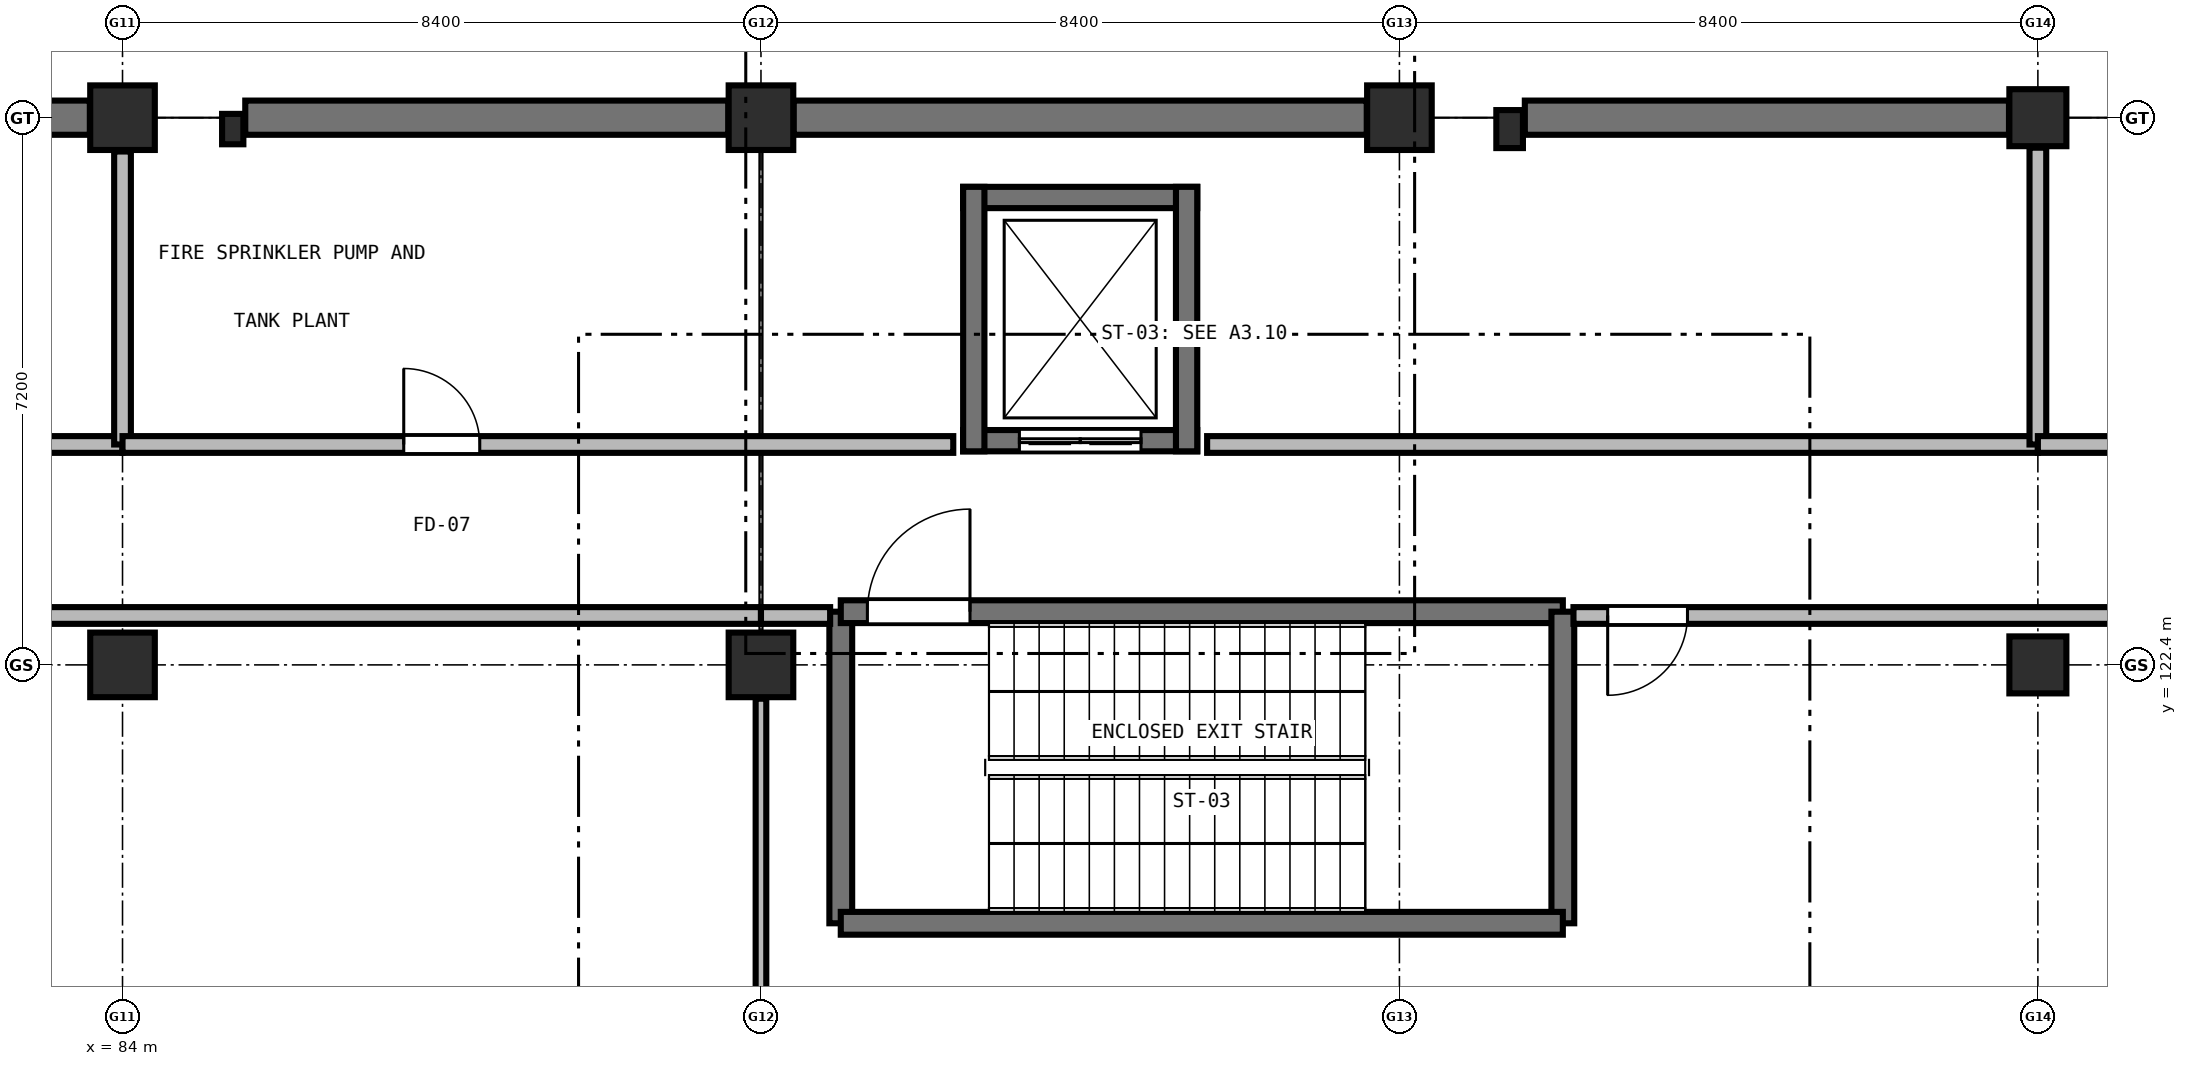
"""IFC4 building model, lengths in metres.
Left out: names, types, materials, properties, quantities, classifications, styles, units other than length and angle.
Written with IfcOpenShell. Run it as: python <this file> out.ifc"""

import sys

from ifc_helpers import new_model, si_unit, direction, frame, frame_2d, origin, origin_2d, place, context, subcontext, project, spatial, rectangle, extrude, element, fill, save


model = new_model("IFC4")
c1 = context("Model", 3, precision=1e-05, world=origin(), true_north=direction((0.0, 1.0)))
c2 = subcontext(c1, "Body", "Model", "MODEL_VIEW")
j1 = project(units=[si_unit("LENGTHUNIT", "METRE"), si_unit("PLANEANGLEUNIT", "RADIAN")], contexts=[c1])
p1 = place(None, origin())
s1 = spatial("IfcSite", under=j1, at=p1, CompositionType="ELEMENT")
p2 = place(p1, origin())
s2 = spatial("IfcBuilding", under=s1, at=p2, CompositionType="ELEMENT")
p3 = place(p2, frame((0.0, 0.0, -4.8)))
s3 = spatial("IfcBuildingStorey", under=s2, at=p3, CompositionType="ELEMENT", Elevation=-4.8)
for number, where, z_axis, x_axis in (
    (1, (84.0, 122.4, 0.0), (0.0, 0.0, 1.0), (1.0, 0.0, 0.0)),
    (2, (84.0, 129.6, 0.0), (0.0, 0.0, 1.0), (1.0, 0.0, 0.0)),
    (3, (92.4, 122.4, 0.0), (0.0, 0.0, 1.0), (1.0, 0.0, 0.0)),
    (4, (92.4, 129.6, 0.0), (0.0, 0.0, 1.0), (1.0, 0.0, 0.0)),
    (5, (100.8, 129.6, 0.0), (0.0, 0.0, 1.0), (1.0, 0.0, 0.0)),
):
    element("IfcColumn", number, at=place(p3, frame(where, z_axis=z_axis, x_axis=x_axis)), inside=s3, PredefinedType="COLUMN", context=c2, shape_type="SweptSolid", body=[
        extrude(rectangle(XDim=0.85, YDim=0.85, at=origin_2d()), origin(), (0.0, 0.0, 1.0), 4.8),
    ])
for number, where, z_axis, x_axis in (
    (6, (109.2, 122.4, 0.0), (0.0, 0.0, 1.0), (1.0, 0.0, 0.0)),
    (7, (109.2, 129.6, 0.0), (0.0, 0.0, 1.0), (1.0, 0.0, 0.0)),
):
    element("IfcColumn", number, at=place(p3, frame(where, z_axis=z_axis, x_axis=x_axis)), inside=s3, PredefinedType="COLUMN", context=c2, shape_type="SweptSolid", body=[
        extrude(rectangle(XDim=0.75, YDim=0.75, at=origin_2d()), origin(), (0.0, 0.0, 1.0), 4.8),
    ])
p4 = place(p3, frame((85.45, 129.45, 0.0), z_axis=(0.0, 0.0, 1.0), x_axis=(1.0, 0.0, 0.0)))
e8 = element("IfcColumn", 8, at=p4, inside=s3, PredefinedType="PILASTER", context=c2, shape_type="SweptSolid", body=[
    extrude(rectangle(XDim=0.28, YDim=0.4, at=origin_2d()), origin(), (0.0, 0.0, 1.0), 3.85),
])
p5 = place(p3, frame((102.25, 129.45, 0.0), z_axis=(0.0, 0.0, 1.0), x_axis=(1.0, 0.0, 0.0)))
e9 = element("IfcColumn", 9, at=p5, inside=s3, PredefinedType="PILASTER", context=c2, shape_type="SweptSolid", body=[
    extrude(rectangle(XDim=0.35, YDim=0.5, at=origin_2d()), origin(), (0.0, 0.0, 1.0), 3.85),
])
p6 = place(p3, frame((77.225, 129.6, 0.0), z_axis=(0.0, 0.0, 1.0), x_axis=(1.0, 0.0, 0.0)))
e10 = element("IfcWall", 10, at=p6, inside=s3, PredefinedType="SHEAR", context=c2, shape_type="SweptSolid", body=[
    extrude(rectangle(XDim=6.345, YDim=0.45, at=frame_2d((3.172, 0.0))), origin(), (0.0, 0.0, 1.0), 3.64),
])
p7 = place(p3, frame((85.615, 129.6, 0.0), z_axis=(0.0, 0.0, 1.0), x_axis=(1.0, 0.0, 0.0)))
e11 = element("IfcWall", 11, at=p7, inside=s3, PredefinedType="SHEAR", context=c2, shape_type="SweptSolid", body=[
    extrude(rectangle(XDim=6.355, YDim=0.45, at=frame_2d((3.177, 0.0))), origin(), (0.0, 0.0, 1.0), 3.64),
])
p8 = place(p3, frame((92.83, 129.6, 0.0), z_axis=(0.0, 0.0, 1.0), x_axis=(1.0, 0.0, 0.0)))
e12 = element("IfcWall", 12, at=p8, inside=s3, PredefinedType="SHEAR", context=c2, shape_type="SweptSolid", body=[
    extrude(rectangle(XDim=7.54, YDim=0.45, at=frame_2d((3.77, 0.0))), origin(), (0.0, 0.0, 1.0), 3.64),
])
p9 = place(p3, frame((102.45, 129.6, 0.0), z_axis=(0.0, 0.0, 1.0), x_axis=(1.0, 0.0, 0.0)))
e13 = element("IfcWall", 13, at=p9, inside=s3, PredefinedType="SHEAR", context=c2, shape_type="SweptSolid", body=[
    extrude(rectangle(XDim=6.37, YDim=0.45, at=frame_2d((3.185, 0.0))), origin(), (0.0, 0.0, 1.0), 3.64),
])
p10 = place(p3, frame((93.45, 119.0, 0.0), z_axis=(0.0, 0.0, 1.0), x_axis=(0.0, 1.0, 0.0)))
e14 = element("IfcWall", 14, at=p10, inside=s3, PredefinedType="SHEAR", context=c2, shape_type="SweptSolid", body=[
    extrude(rectangle(XDim=4.1, YDim=0.3, at=frame_2d((2.05, 0.0))), origin(), (0.0, 0.0, 1.0), 4.5),
])
p11 = place(p3, frame((93.45, 123.1, 0.0), z_axis=(0.0, 0.0, 1.0), x_axis=(1.0, 0.0, 0.0)))
e15 = element("IfcWall", 15, at=p11, inside=s3, PredefinedType="SHEAR", context=c2, shape_type="SweptSolid", body=[
    extrude(rectangle(XDim=9.5, YDim=0.3, at=frame_2d((4.75, 0.0))), origin(), (0.0, 0.0, 1.0), 4.5),
])
p12 = place(p11, frame((0.35, 0.0, 0.0)))
e16 = element("IfcOpeningElement", 16, at=p12, cuts=e15, PredefinedType="OPENING", context=c2, shape_type="SweptSolid", body=[
    extrude(rectangle(XDim=1.35, YDim=2.2, at=frame_2d((0.675, 1.1))), frame((0.0, 0.16, 0.0), z_axis=(0.0, -1.0, 0.0), x_axis=(1.0, 0.0, 0.0)), (0.0, 0.0, 1.0), 0.32),
])
p13 = place(p3, frame((102.95, 123.1, 0.0), z_axis=(0.0, 0.0, 1.0), x_axis=(0.0, -1.0, 0.0)))
e17 = element("IfcWall", 17, at=p13, inside=s3, PredefinedType="SHEAR", context=c2, shape_type="SweptSolid", body=[
    extrude(rectangle(XDim=4.1, YDim=0.3, at=frame_2d((2.05, 0.0))), origin(), (0.0, 0.0, 1.0), 4.5),
])
p14 = place(p3, frame((102.95, 119.0, 0.0), z_axis=(0.0, 0.0, 1.0), x_axis=(-1.0, 0.0, 0.0)))
e18 = element("IfcWall", 18, at=p14, inside=s3, PredefinedType="SHEAR", context=c2, shape_type="SweptSolid", body=[
    extrude(rectangle(XDim=9.5, YDim=0.3, at=frame_2d((4.75, 0.0))), origin(), (0.0, 0.0, 1.0), 4.5),
])
p15 = place(p3, frame((98.14, 125.35, 0.0), z_axis=(0.0, 0.0, 1.0), x_axis=(-1.0, 0.0, 0.0)))
e19 = element("IfcWall", 19, at=p15, inside=s3, PredefinedType="SHEAR", context=c2, shape_type="SweptSolid", body=[
    extrude(rectangle(XDim=3.08, YDim=0.28, at=frame_2d((1.54, 0.0))), origin(), (0.0, 0.0, 1.0), 4.5),
])
p16 = place(p15, frame((0.74, 0.0, 0.0)))
e20 = element("IfcOpeningElement", 20, at=p16, cuts=e19, PredefinedType="OPENING", context=c2, shape_type="SweptSolid", body=[
    extrude(rectangle(XDim=1.6, YDim=2.2, at=frame_2d((0.8, 1.1))), frame((0.0, 0.15, 0.0), z_axis=(0.0, -1.0, 0.0), x_axis=(1.0, 0.0, 0.0)), (0.0, 0.0, 1.0), 0.3),
])
p17 = place(p3, frame((95.06, 128.55, 0.0), z_axis=(0.0, 0.0, 1.0), x_axis=(1.0, 0.0, 0.0)))
e21 = element("IfcWall", 21, at=p17, inside=s3, PredefinedType="SHEAR", context=c2, shape_type="SweptSolid", body=[
    extrude(rectangle(XDim=3.08, YDim=0.28, at=frame_2d((1.54, 0.0))), origin(), (0.0, 0.0, 1.0), 4.5),
])
for number, where, z_axis, x_axis in (
    (22, (95.2, 125.21, 0.0), (0.0, 0.0, 1.0), (0.0, 1.0, 0.0)),
    (23, (98.0, 128.69, 0.0), (0.0, 0.0, 1.0), (0.0, -1.0, 0.0)),
):
    element("IfcWall", number, at=place(p3, frame(where, z_axis=z_axis, x_axis=x_axis)), inside=s3, PredefinedType="SHEAR", context=c2, shape_type="SweptSolid", body=[
        extrude(rectangle(XDim=3.48, YDim=0.28, at=frame_2d((1.74, 0.0))), origin(), (0.0, 0.0, 1.0), 4.5),
    ])
p18 = place(p3, frame((56.07, 125.3, 0.0), z_axis=(0.0, 0.0, 1.0), x_axis=(1.0, 0.0, 0.0)))
e24 = element("IfcWall", 24, at=p18, inside=s3, PredefinedType="SOLIDWALL", context=c2, shape_type="SweptSolid", body=[
    extrude(rectangle(XDim=27.93, YDim=0.22, at=frame_2d((13.965, 0.0))), origin(), (0.0, 0.0, 1.0), 3.785),
])
p19 = place(p3, frame((84.0, 125.3, 0.0), z_axis=(0.0, 0.0, 1.0), x_axis=(0.0, 1.0, 0.0)))
e25 = element("IfcWall", 25, at=p19, inside=s3, PredefinedType="SOLIDWALL", context=c2, shape_type="SweptSolid", body=[
    extrude(rectangle(XDim=3.855, YDim=0.22, at=frame_2d((1.927, 0.0))), origin(), (0.0, 0.0, 1.0), 3.635),
])
p20 = place(p3, frame((84.0, 125.3, 0.0), z_axis=(0.0, 0.0, 1.0), x_axis=(1.0, 0.0, 0.0)))
e26 = element("IfcWall", 26, at=p20, inside=s3, PredefinedType="SOLIDWALL", context=c2, shape_type="SweptSolid", body=[
    extrude(rectangle(XDim=10.93, YDim=0.22, at=frame_2d((5.465, 0.0))), origin(), (0.0, 0.0, 1.0), 3.785),
])
p21 = place(p20, frame((3.7, 0.0, 0.0)))
e27 = element("IfcOpeningElement", 27, at=p21, cuts=e26, PredefinedType="OPENING", context=c2, shape_type="SweptSolid", body=[
    extrude(rectangle(XDim=1.0, YDim=2.1, at=frame_2d((0.5, 1.05))), frame((0.0, 0.12, 0.0), z_axis=(0.0, -1.0, 0.0), x_axis=(1.0, 0.0, 0.0)), (0.0, 0.0, 1.0), 0.24),
])
p22 = place(p3, frame((98.27, 125.3, 0.0), z_axis=(0.0, 0.0, 1.0), x_axis=(1.0, 0.0, 0.0)))
e28 = element("IfcWall", 28, at=p22, inside=s3, PredefinedType="SOLIDWALL", context=c2, shape_type="SweptSolid", body=[
    extrude(rectangle(XDim=10.93, YDim=0.22, at=frame_2d((5.465, 0.0))), origin(), (0.0, 0.0, 1.0), 3.785),
])
p23 = place(p3, frame((109.2, 125.3, 0.0), z_axis=(0.0, 0.0, 1.0), x_axis=(0.0, 1.0, 0.0)))
e29 = element("IfcWall", 29, at=p23, inside=s3, PredefinedType="SOLIDWALL", context=c2, shape_type="SweptSolid", body=[
    extrude(rectangle(XDim=3.905, YDim=0.22, at=frame_2d((1.953, 0.0))), origin(), (0.0, 0.0, 1.0), 3.635),
])
p24 = place(p3, frame((109.2, 125.3, 0.0), z_axis=(0.0, 0.0, 1.0), x_axis=(1.0, 0.0, 0.0)))
e30 = element("IfcWall", 30, at=p24, inside=s3, PredefinedType="SOLIDWALL", context=c2, shape_type="SweptSolid", body=[
    extrude(rectangle(XDim=24.98, YDim=0.22, at=frame_2d((12.49, 0.0))), origin(), (0.0, 0.0, 1.0), 3.785),
])
p25 = place(p24, frame((3.475, 0.0, 0.0)))
e31 = element("IfcOpeningElement", 31, at=p25, cuts=e30, PredefinedType="OPENING", context=c2, shape_type="SweptSolid", body=[
    extrude(rectangle(XDim=1.45, YDim=2.2, at=frame_2d((0.725, 1.1))), frame((0.0, 0.12, 0.0), z_axis=(0.0, -1.0, 0.0), x_axis=(1.0, 0.0, 0.0)), (0.0, 0.0, 1.0), 0.24),
])
p26 = place(p3, frame((92.4, 123.05, 0.0), z_axis=(0.0, 0.0, 1.0), x_axis=(-1.0, 0.0, 0.0)))
e32 = element("IfcWall", 32, at=p26, inside=s3, PredefinedType="SOLIDWALL", context=c2, shape_type="SweptSolid", body=[
    extrude(rectangle(XDim=31.31, YDim=0.22, at=frame_2d((15.655, 0.0))), origin(), (0.0, 0.0, 1.0), 3.785),
])
p27 = place(p26, frame((26.65, 0.0, 0.0)))
e33 = element("IfcOpeningElement", 33, at=p27, cuts=e32, PredefinedType="OPENING", context=c2, shape_type="SweptSolid", body=[
    extrude(rectangle(XDim=1.3, YDim=2.15, at=frame_2d((0.65, 1.075))), frame((0.0, 0.12, 0.0), z_axis=(0.0, -1.0, 0.0), x_axis=(1.0, 0.0, 0.0)), (0.0, 0.0, 1.0), 0.24),
])
p28 = place(p3, frame((92.4, 115.595, 0.0), z_axis=(0.0, 0.0, 1.0), x_axis=(0.0, 1.0, 0.0)))
e34 = element("IfcWall", 34, at=p28, inside=s3, PredefinedType="PARTITIONING", context=c2, shape_type="SweptSolid", body=[
    extrude(rectangle(XDim=6.36, YDim=0.14, at=frame_2d((3.18, 0.0))), origin(), (0.0, 0.0, 1.0), 3.635),
])
p29 = place(p3, frame((134.18, 123.05, 0.0), z_axis=(0.0, 0.0, 1.0), x_axis=(-1.0, 0.0, 0.0)))
e35 = element("IfcWall", 35, at=p29, inside=s3, PredefinedType="SOLIDWALL", context=c2, shape_type="SweptSolid", body=[
    extrude(rectangle(XDim=31.09, YDim=0.22, at=frame_2d((15.545, 0.0))), origin(), (0.0, 0.0, 1.0), 3.785),
])
p30 = place(p29, frame((29.59, 0.0, 0.0)))
e36 = element("IfcOpeningElement", 36, at=p30, cuts=e35, PredefinedType="OPENING", context=c2, shape_type="SweptSolid", body=[
    extrude(rectangle(XDim=1.05, YDim=2.15, at=frame_2d((0.525, 1.075))), frame((0.0, 0.12, 0.0), z_axis=(0.0, -1.0, 0.0), x_axis=(1.0, 0.0, 0.0)), (0.0, 0.0, 1.0), 0.24),
])
p31 = place(p3, frame((93.31, 123.05, 0.0), z_axis=(0.0, 0.0, 1.0), x_axis=(-1.0, 0.0, 0.0)))
e37 = element("IfcWall", 37, at=p31, inside=s3, PredefinedType="SOLIDWALL", context=c2, shape_type="SweptSolid", body=[
    extrude(rectangle(XDim=0.91, YDim=0.22, at=frame_2d((0.455, 0.0))), origin(), (0.0, 0.0, 1.0), 3.785),
])
p32 = place(p12, origin())
e38 = element("IfcDoor", 38, at=p32, inside=s3, OperationType="SINGLE_SWING_RIGHT", PredefinedType="DOOR", context=c2, shape_type="SweptSolid", body=[
    extrude(rectangle(XDim=1.35, YDim=2.2, at=frame_2d((0.675, 1.1))), frame((0.0, 0.025, 0.0), z_axis=(0.0, -1.0, 0.0), x_axis=(1.0, 0.0, 0.0)), (0.0, 0.0, 1.0), 0.05),
])
fill(e16, e38)
p33 = place(p16, origin())
e39 = element("IfcDoor", 39, at=p33, inside=s3, OperationType="DOUBLE_DOOR_SLIDING", PredefinedType="DOOR", context=c2, shape_type="SweptSolid", body=[
    extrude(rectangle(XDim=1.6, YDim=2.2, at=frame_2d((0.8, 1.1))), frame((0.0, 0.025, 0.0), z_axis=(0.0, -1.0, 0.0), x_axis=(1.0, 0.0, 0.0)), (0.0, 0.0, 1.0), 0.05),
])
fill(e20, e39)
p34 = place(p21, origin())
e40 = element("IfcDoor", 40, at=p34, inside=s3, OperationType="SINGLE_SWING_LEFT", PredefinedType="DOOR", context=c2, shape_type="SweptSolid", body=[
    extrude(rectangle(XDim=1.0, YDim=2.1, at=frame_2d((0.5, 1.05))), frame((0.0, 0.025, 0.0), z_axis=(0.0, -1.0, 0.0), x_axis=(1.0, 0.0, 0.0)), (0.0, 0.0, 1.0), 0.05),
])
fill(e27, e40)
p35 = place(p30, origin())
e41 = element("IfcDoor", 41, at=p35, inside=s3, OperationType="SINGLE_SWING_RIGHT", PredefinedType="DOOR", context=c2, shape_type="SweptSolid", body=[
    extrude(rectangle(XDim=1.05, YDim=2.15, at=frame_2d((0.525, 1.075))), frame((0.0, 0.025, 0.0), z_axis=(0.0, -1.0, 0.0), x_axis=(1.0, 0.0, 0.0)), (0.0, 0.0, 1.0), 0.05),
])
fill(e36, e41)
save(model, sys.argv[1])
